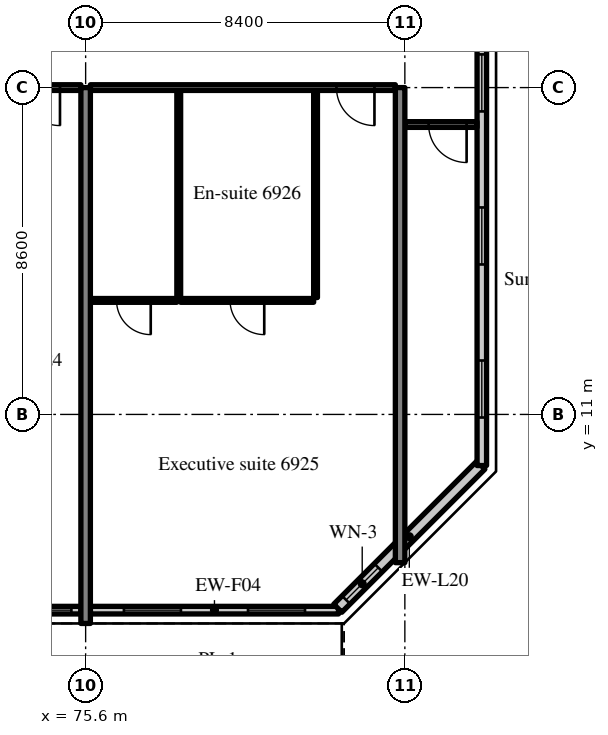
"""IFC4 building model, lengths in metres.
Left out: names, types, materials, properties, quantities, classifications, styles, units other than length and angle.
Written with IfcOpenShell. Run it as: python <this file> out.ifc"""

import sys

from ifc_helpers import new_model, si_unit, direction, frame, frame_2d, origin, place, context, subcontext, project, spatial, rectangle, extrude, source, transform, mapped, element, fill, save


model = new_model("IFC4")
c1 = context("Model", 3, precision=1e-05, world=origin(), true_north=direction((0.0, 1.0)))
c2 = subcontext(c1, "Body", "Model", "MODEL_VIEW")
j1 = project(units=[si_unit("LENGTHUNIT", "METRE"), si_unit("PLANEANGLEUNIT", "RADIAN")], contexts=[c1])
p1 = place(None, origin())
s1 = spatial("IfcSite", under=j1, at=p1, CompositionType="ELEMENT")
p2 = place(p1, origin())
s2 = spatial("IfcBuilding", under=s1, at=p2, CompositionType="ELEMENT")
p3 = place(p2, frame((0.0, 0.0, 289.7)))
s3 = spatial("IfcBuildingStorey", under=s2, at=p3, CompositionType="ELEMENT", Elevation=289.7)
m1 = source(origin(), c2, "Body", "SweptSolid", [
    extrude(rectangle(XDim=14.1, YDim=0.25, at=frame_2d((7.05, 0.0))), origin(), (0.0, 0.0, 1.0), 3.72),
])
p4 = place(p3, frame((75.6, 5.5, 0.0), z_axis=(0.0, 0.0, 1.0), x_axis=(0.0, 1.0, 0.0)))
e1 = element("IfcWall", 1, at=p4, inside=s3, PredefinedType="SHEAR", context=c2, shape_type="MappedRepresentation", body=[
    mapped(m1, transform((0.0, 0.0, 0.0), scale=1.0)),
])
m2 = source(origin(), c2, "Body", "SweptSolid", [
    extrude(rectangle(XDim=12.5, YDim=0.25, at=frame_2d((6.25, 0.0))), origin(), (0.0, 0.0, 1.0), 3.72),
])
p5 = place(p3, frame((83.875, 7.1, 0.0), z_axis=(0.0, 0.0, 1.0), x_axis=(0.0, 1.0, 0.0)))
e2 = element("IfcWall", 2, at=p5, inside=s3, PredefinedType="SHEAR", context=c2, shape_type="MappedRepresentation", body=[
    mapped(m2, transform((0.0, 0.0, 0.0), scale=1.0)),
])
m3 = source(origin(), c2, "Body", "SweptSolid", [
    extrude(rectangle(XDim=8.15, YDim=0.2, at=frame_2d((4.075, 0.0))), origin(), (0.0, 0.0, 1.0), 3.17),
])
p6 = place(p3, frame((67.325, 5.85, 0.0), z_axis=(0.0, 0.0, 1.0), x_axis=(1.0, 0.0, 0.0)))
e3 = element("IfcWall", 3, at=p6, inside=s3, PredefinedType="SOLIDWALL", context=c2, shape_type="MappedRepresentation", body=[
    mapped(m3, transform((0.0, 0.0, 0.0), scale=1.0)),
])
m4 = source(origin(), c2, "Body", "SweptSolid", [
    extrude(rectangle(XDim=1.2, YDim=2.4, at=frame_2d((0.6, 1.2))), frame((0.0, 0.11, 0.0), z_axis=(0.0, -1.0, 0.0), x_axis=(1.0, 0.0, 0.0)), (0.0, 0.0, 1.0), 0.22),
])
p7 = place(p6, frame((0.25, 0.0, 0.0)))
e4 = element("IfcOpeningElement", 4, at=p7, cuts=e3, PredefinedType="OPENING", context=c2, shape_type="MappedRepresentation", body=[
    mapped(m4, transform((0.0, 0.0, 0.0), scale=1.0)),
])
m5 = source(origin(), c2, "Body", "SweptSolid", [
    extrude(rectangle(XDim=1.5, YDim=1.5, at=frame_2d((0.75, 0.75))), frame((0.0, 0.11, 0.0), z_axis=(0.0, -1.0, 0.0), x_axis=(1.0, 0.0, 0.0)), (0.0, 0.0, 1.0), 0.22),
])
p8 = place(p6, frame((2.325, 0.0, 0.9)))
e5 = element("IfcOpeningElement", 5, at=p8, cuts=e3, PredefinedType="OPENING", context=c2, shape_type="MappedRepresentation", body=[
    mapped(m5, transform((0.0, 0.0, 0.0), scale=1.0)),
])
p9 = place(p6, frame((4.325, 0.0, 0.0)))
e6 = element("IfcOpeningElement", 6, at=p9, cuts=e3, PredefinedType="OPENING", context=c2, shape_type="MappedRepresentation", body=[
    mapped(m4, transform((0.0, 0.0, 0.0), scale=1.0)),
])
p10 = place(p6, frame((6.4, 0.0, 0.9)))
e7 = element("IfcOpeningElement", 7, at=p10, cuts=e3, PredefinedType="OPENING", context=c2, shape_type="MappedRepresentation", body=[
    mapped(m5, transform((0.0, 0.0, 0.0), scale=1.0)),
])
m6 = source(origin(), c2, "Body", "SweptSolid", [
    extrude(rectangle(XDim=6.53, YDim=0.2, at=frame_2d((3.265, 0.0))), origin(), (0.0, 0.0, 1.0), 3.17),
])
p11 = place(p3, frame((75.725, 5.85, 0.0), z_axis=(0.0, 0.0, 1.0), x_axis=(1.0, 0.0, 0.0)))
e8 = element("IfcWall", 8, at=p11, inside=s3, PredefinedType="SOLIDWALL", context=c2, shape_type="MappedRepresentation", body=[
    mapped(m6, transform((0.0, 0.0, 0.0), scale=1.0)),
])
p12 = place(p11, frame((0.883, 0.0, 0.9)))
e9 = element("IfcOpeningElement", 9, at=p12, cuts=e8, PredefinedType="OPENING", context=c2, shape_type="MappedRepresentation", body=[
    mapped(m5, transform((0.0, 0.0, 0.0), scale=1.0)),
])
p13 = place(p11, frame((4.147, 0.0, 0.9)))
e10 = element("IfcOpeningElement", 10, at=p13, cuts=e8, PredefinedType="OPENING", context=c2, shape_type="MappedRepresentation", body=[
    mapped(m5, transform((0.0, 0.0, 0.0), scale=1.0)),
])
m7 = source(origin(), c2, "Body", "SweptSolid", [
    extrude(rectangle(XDim=5.326, YDim=0.3, at=frame_2d((2.663, 0.0))), origin(), (0.0, 0.0, 1.0), 3.72),
])
p14 = place(p3, frame((82.234, 5.9, 0.0), z_axis=(0.0, 0.0, 1.0), x_axis=(0.707083859269, 0.707129702361, 0.0)))
e11 = element("IfcWall", 11, at=p14, inside=s3, PredefinedType="SOLIDWALL", context=c2, shape_type="MappedRepresentation", body=[
    mapped(m7, transform((0.0, 0.0, 0.0), scale=1.0)),
])
m8 = source(origin(), c2, "Body", "SweptSolid", [
    extrude(rectangle(XDim=1.2, YDim=1.5, at=frame_2d((0.6, 0.75))), frame((0.0, 0.16, 0.0), z_axis=(0.0, -1.0, 0.0), x_axis=(1.0, 0.0, 0.0)), (0.0, 0.0, 1.0), 0.32),
])
p15 = place(p14, frame((0.31, 0.0, 0.9)))
e12 = element("IfcOpeningElement", 12, at=p15, cuts=e11, PredefinedType="OPENING", context=c2, shape_type="MappedRepresentation", body=[
    mapped(m8, transform((0.0, 0.0, 0.0), scale=1.0)),
])
m9 = source(origin(), c2, "Body", "SweptSolid", [
    extrude(rectangle(XDim=28.189, YDim=0.25, at=frame_2d((14.095, 0.0))), origin(), (0.0, 0.0, 1.0), 3.72),
])
p16 = place(p3, frame((86.025, 9.655, 0.0), z_axis=(0.0, 0.0, 1.0), x_axis=(0.0, 1.0, 0.0)))
e13 = element("IfcWall", 13, at=p16, inside=s3, PredefinedType="SOLIDWALL", context=c2, shape_type="MappedRepresentation", body=[
    mapped(m9, transform((0.0, 0.0, 0.0), scale=1.0)),
])
m10 = source(origin(), c2, "Body", "SweptSolid", [
    extrude(rectangle(XDim=1.5, YDim=1.5, at=frame_2d((0.75, 0.75))), frame((0.0, 0.135, 0.0), z_axis=(0.0, -1.0, 0.0), x_axis=(1.0, 0.0, 0.0)), (0.0, 0.0, 1.0), 0.27),
])
p17 = place(p16, frame((1.263, 0.0, 0.9)))
e14 = element("IfcOpeningElement", 14, at=p17, cuts=e13, PredefinedType="OPENING", context=c2, shape_type="MappedRepresentation", body=[
    mapped(m10, transform((0.0, 0.0, 0.0), scale=1.0)),
])
p18 = place(p16, frame((5.291, 0.0, 0.9)))
e15 = element("IfcOpeningElement", 15, at=p18, cuts=e13, PredefinedType="OPENING", context=c2, shape_type="MappedRepresentation", body=[
    mapped(m10, transform((0.0, 0.0, 0.0), scale=1.0)),
])
p19 = place(p16, frame((9.318, 0.0, 0.9)))
e16 = element("IfcOpeningElement", 16, at=p19, cuts=e13, PredefinedType="OPENING", context=c2, shape_type="MappedRepresentation", body=[
    mapped(m10, transform((0.0, 0.0, 0.0), scale=1.0)),
])
p20 = place(p16, frame((13.345, 0.0, 0.9)))
e17 = element("IfcOpeningElement", 17, at=p20, cuts=e13, PredefinedType="OPENING", context=c2, shape_type="MappedRepresentation", body=[
    mapped(m10, transform((0.0, 0.0, 0.0), scale=1.0)),
])
p21 = place(p16, frame((17.372, 0.0, 0.9)))
e18 = element("IfcOpeningElement", 18, at=p21, cuts=e13, PredefinedType="OPENING", context=c2, shape_type="MappedRepresentation", body=[
    mapped(m10, transform((0.0, 0.0, 0.0), scale=1.0)),
])
p22 = place(p16, frame((21.399, 0.0, 0.9)))
e19 = element("IfcOpeningElement", 19, at=p22, cuts=e13, PredefinedType="OPENING", context=c2, shape_type="MappedRepresentation", body=[
    mapped(m10, transform((0.0, 0.0, 0.0), scale=1.0)),
])
p23 = place(p16, frame((25.426, 0.0, 0.9)))
e20 = element("IfcOpeningElement", 20, at=p23, cuts=e13, PredefinedType="OPENING", context=c2, shape_type="MappedRepresentation", body=[
    mapped(m10, transform((0.0, 0.0, 0.0), scale=1.0)),
])
m11 = source(origin(), c2, "Body", "SweptSolid", [
    extrude(rectangle(XDim=8.15, YDim=0.15, at=frame_2d((4.075, 0.0))), origin(), (0.0, 0.0, 1.0), 3.02),
])
p24 = place(p3, frame((67.325, 19.6, 0.0), z_axis=(0.0, 0.0, 1.0), x_axis=(1.0, 0.0, 0.0)))
e21 = element("IfcWall", 21, at=p24, inside=s3, PredefinedType="PARTITIONING", context=c2, shape_type="MappedRepresentation", body=[
    mapped(m11, transform((0.0, 0.0, 0.0), scale=1.0)),
])
m12 = source(origin(), c2, "Body", "SweptSolid", [
    extrude(rectangle(XDim=1.0, YDim=2.1, at=frame_2d((0.5, 1.05))), frame((0.0, 0.085, 0.0), z_axis=(0.0, -1.0, 0.0), x_axis=(1.0, 0.0, 0.0)), (0.0, 0.0, 1.0), 0.17),
])
p25 = place(p24, frame((6.6, 0.0, 0.0)))
e22 = element("IfcOpeningElement", 22, at=p25, cuts=e21, PredefinedType="OPENING", context=c2, shape_type="MappedRepresentation", body=[
    mapped(m12, transform((0.0, 0.0, 0.0), scale=1.0)),
])
m13 = source(origin(), c2, "Body", "SweptSolid", [
    extrude(rectangle(XDim=5.45, YDim=0.1, at=frame_2d((2.725, 0.0))), origin(), (0.0, 0.0, 1.0), 3.72),
])
for number, where, z_axis, x_axis in (
    (23, (81.65, 14.075, 0.0), (0.0, 0.0, 1.0), (0.0, 1.0, 0.0)),
    (24, (78.05, 14.075, 0.0), (0.0, 0.0, 1.0), (0.0, 1.0, 0.0)),
):
    element("IfcWall", number, at=place(p3, frame(where, z_axis=z_axis, x_axis=x_axis)), inside=s3, PredefinedType="PARTITIONING", context=c2, shape_type="MappedRepresentation", body=[
        mapped(m13, transform((0.0, 0.0, 0.0), scale=1.0)),
    ])
m14 = source(origin(), c2, "Body", "SweptSolid", [
    extrude(rectangle(XDim=3.5, YDim=0.1, at=frame_2d((1.75, 0.0))), origin(), (0.0, 0.0, 1.0), 3.72),
])
p26 = place(p3, frame((78.1, 14.0, 0.0), z_axis=(0.0, 0.0, 1.0), x_axis=(1.0, 0.0, 0.0)))
e25 = element("IfcWall", 25, at=p26, inside=s3, PredefinedType="PARTITIONING", context=c2, shape_type="MappedRepresentation", body=[
    mapped(m14, transform((0.0, 0.0, 0.0), scale=1.0)),
])
m15 = source(origin(), c2, "Body", "SweptSolid", [
    extrude(rectangle(XDim=0.9, YDim=2.1, at=frame_2d((0.45, 1.05))), frame((0.0, 0.06, 0.0), z_axis=(0.0, -1.0, 0.0), x_axis=(1.0, 0.0, 0.0)), (0.0, 0.0, 1.0), 0.12),
])
p27 = place(p26, frame((1.3, 0.0, 0.0)))
e26 = element("IfcOpeningElement", 26, at=p27, cuts=e25, PredefinedType="OPENING", context=c2, shape_type="MappedRepresentation", body=[
    mapped(m15, transform((0.0, 0.0, 0.0), scale=1.0)),
])
m16 = source(origin(), c2, "Body", "SweptSolid", [
    extrude(rectangle(XDim=2.275, YDim=0.1, at=frame_2d((1.137, 0.0))), origin(), (0.0, 0.0, 1.0), 3.72),
])
p28 = place(p3, frame((75.725, 14.0, 0.0), z_axis=(0.0, 0.0, 1.0), x_axis=(1.0, 0.0, 0.0)))
e27 = element("IfcWall", 27, at=p28, inside=s3, PredefinedType="PARTITIONING", context=c2, shape_type="MappedRepresentation", body=[
    mapped(m16, transform((0.0, 0.0, 0.0), scale=1.0)),
])
p29 = place(p28, frame((0.688, 0.0, 0.0)))
e28 = element("IfcOpeningElement", 28, at=p29, cuts=e27, PredefinedType="OPENING", context=c2, shape_type="MappedRepresentation", body=[
    mapped(m15, transform((0.0, 0.0, 0.0), scale=1.0)),
])
m17 = source(origin(), c2, "Body", "SweptSolid", [
    extrude(rectangle(XDim=8.025, YDim=0.15, at=frame_2d((4.012, 0.0))), origin(), (0.0, 0.0, 1.0), 3.02),
])
p30 = place(p3, frame((75.725, 19.6, 0.0), z_axis=(0.0, 0.0, 1.0), x_axis=(1.0, 0.0, 0.0)))
e29 = element("IfcWall", 29, at=p30, inside=s3, PredefinedType="PARTITIONING", context=c2, shape_type="MappedRepresentation", body=[
    mapped(m17, transform((0.0, 0.0, 0.0), scale=1.0)),
])
p31 = place(p30, frame((6.475, 0.0, 0.0)))
e30 = element("IfcOpeningElement", 30, at=p31, cuts=e29, PredefinedType="OPENING", context=c2, shape_type="MappedRepresentation", body=[
    mapped(m12, transform((0.0, 0.0, 0.0), scale=1.0)),
])
m18 = source(origin(), c2, "Body", "SweptSolid", [
    extrude(rectangle(XDim=1.9, YDim=0.15, at=frame_2d((0.95, 0.0))), origin(), (0.0, 0.0, 1.0), 3.02),
])
p32 = place(p3, frame((84.0, 18.628, 0.0), z_axis=(0.0, 0.0, 1.0), x_axis=(1.0, 0.0, 0.0)))
e31 = element("IfcWall", 31, at=p32, inside=s3, PredefinedType="PARTITIONING", context=c2, shape_type="MappedRepresentation", body=[
    mapped(m18, transform((0.0, 0.0, 0.0), scale=1.0)),
])
p33 = place(p32, frame((0.625, 0.0, 0.0)))
e32 = element("IfcOpeningElement", 32, at=p33, cuts=e31, PredefinedType="OPENING", context=c2, shape_type="MappedRepresentation", body=[
    mapped(m12, transform((0.0, 0.0, 0.0), scale=1.0)),
])
m19 = source(origin(), c2, "Body", "SweptSolid", [
    extrude(rectangle(XDim=1.5, YDim=1.5, at=frame_2d((0.75, 0.75))), frame((0.0, 0.03, 0.0), z_axis=(0.0, -1.0, 0.0), x_axis=(1.0, 0.0, 0.0)), (0.0, 0.0, 1.0), 0.06),
])
p34 = place(p10, origin())
e33 = element("IfcWindow", 33, at=p34, inside=s3, PartitioningType="SINGLE_PANEL", PredefinedType="WINDOW", context=c2, shape_type="MappedRepresentation", body=[
    mapped(m19, transform((0.0, 0.0, 0.0), scale=1.0)),
])
fill(e7, e33)
p35 = place(p12, origin())
e34 = element("IfcWindow", 34, at=p35, inside=s3, PartitioningType="SINGLE_PANEL", PredefinedType="WINDOW", context=c2, shape_type="MappedRepresentation", body=[
    mapped(m19, transform((0.0, 0.0, 0.0), scale=1.0)),
])
fill(e9, e34)
p36 = place(p13, origin())
e35 = element("IfcWindow", 35, at=p36, inside=s3, PartitioningType="SINGLE_PANEL", PredefinedType="WINDOW", context=c2, shape_type="MappedRepresentation", body=[
    mapped(m19, transform((0.0, 0.0, 0.0), scale=1.0)),
])
fill(e10, e35)
m20 = source(origin(), c2, "Body", "SweptSolid", [
    extrude(rectangle(XDim=1.2, YDim=1.5, at=frame_2d((0.6, 0.75))), frame((0.0, 0.03, 0.0), z_axis=(0.0, -1.0, 0.0), x_axis=(1.0, 0.0, 0.0)), (0.0, 0.0, 1.0), 0.06),
])
p37 = place(p15, origin())
e36 = element("IfcWindow", 36, at=p37, inside=s3, PartitioningType="SINGLE_PANEL", PredefinedType="WINDOW", context=c2, shape_type="MappedRepresentation", body=[
    mapped(m20, transform((0.0, 0.0, 0.0), scale=1.0)),
])
fill(e12, e36)
p38 = place(p17, origin())
e37 = element("IfcWindow", 37, at=p38, inside=s3, PartitioningType="SINGLE_PANEL", PredefinedType="WINDOW", context=c2, shape_type="MappedRepresentation", body=[
    mapped(m19, transform((0.0, 0.0, 0.0), scale=1.0)),
])
fill(e14, e37)
p39 = place(p18, origin())
e38 = element("IfcWindow", 38, at=p39, inside=s3, PartitioningType="SINGLE_PANEL", PredefinedType="WINDOW", context=c2, shape_type="MappedRepresentation", body=[
    mapped(m19, transform((0.0, 0.0, 0.0), scale=1.0)),
])
fill(e15, e38)
p40 = place(p19, origin())
e39 = element("IfcWindow", 39, at=p40, inside=s3, PartitioningType="SINGLE_PANEL", PredefinedType="WINDOW", context=c2, shape_type="MappedRepresentation", body=[
    mapped(m19, transform((0.0, 0.0, 0.0), scale=1.0)),
])
fill(e16, e39)
m21 = source(origin(), c2, "Body", "SweptSolid", [
    extrude(rectangle(XDim=1.0, YDim=2.1, at=frame_2d((0.5, 1.05))), frame((0.0, 0.025, 0.0), z_axis=(0.0, -1.0, 0.0), x_axis=(1.0, 0.0, 0.0)), (0.0, 0.0, 1.0), 0.05),
])
p41 = place(p25, origin())
e40 = element("IfcDoor", 40, at=p41, inside=s3, OperationType="SINGLE_SWING_RIGHT", PredefinedType="DOOR", context=c2, shape_type="MappedRepresentation", body=[
    mapped(m21, transform((0.0, 0.0, 0.0), scale=1.0)),
])
fill(e22, e40)
m22 = source(origin(), c2, "Body", "SweptSolid", [
    extrude(rectangle(XDim=0.9, YDim=2.1, at=frame_2d((0.45, 1.05))), frame((0.0, 0.025, 0.0), z_axis=(0.0, -1.0, 0.0), x_axis=(1.0, 0.0, 0.0)), (0.0, 0.0, 1.0), 0.05),
])
p42 = place(p27, origin())
e41 = element("IfcDoor", 41, at=p42, inside=s3, OperationType="SINGLE_SWING_RIGHT", PredefinedType="DOOR", context=c2, shape_type="MappedRepresentation", body=[
    mapped(m22, transform((0.0, 0.0, 0.0), scale=1.0)),
])
fill(e26, e41)
p43 = place(p29, origin())
e42 = element("IfcDoor", 42, at=p43, inside=s3, OperationType="SINGLE_SWING_RIGHT", PredefinedType="DOOR", context=c2, shape_type="MappedRepresentation", body=[
    mapped(m22, transform((0.0, 0.0, 0.0), scale=1.0)),
])
fill(e28, e42)
p44 = place(p31, origin())
e43 = element("IfcDoor", 43, at=p44, inside=s3, OperationType="SINGLE_SWING_RIGHT", PredefinedType="DOOR", context=c2, shape_type="MappedRepresentation", body=[
    mapped(m21, transform((0.0, 0.0, 0.0), scale=1.0)),
])
fill(e30, e43)
p45 = place(p33, origin())
e44 = element("IfcDoor", 44, at=p45, inside=s3, OperationType="SINGLE_SWING_RIGHT", PredefinedType="DOOR", context=c2, shape_type="MappedRepresentation", body=[
    mapped(m21, transform((0.0, 0.0, 0.0), scale=1.0)),
])
fill(e32, e44)
save(model, sys.argv[1])
